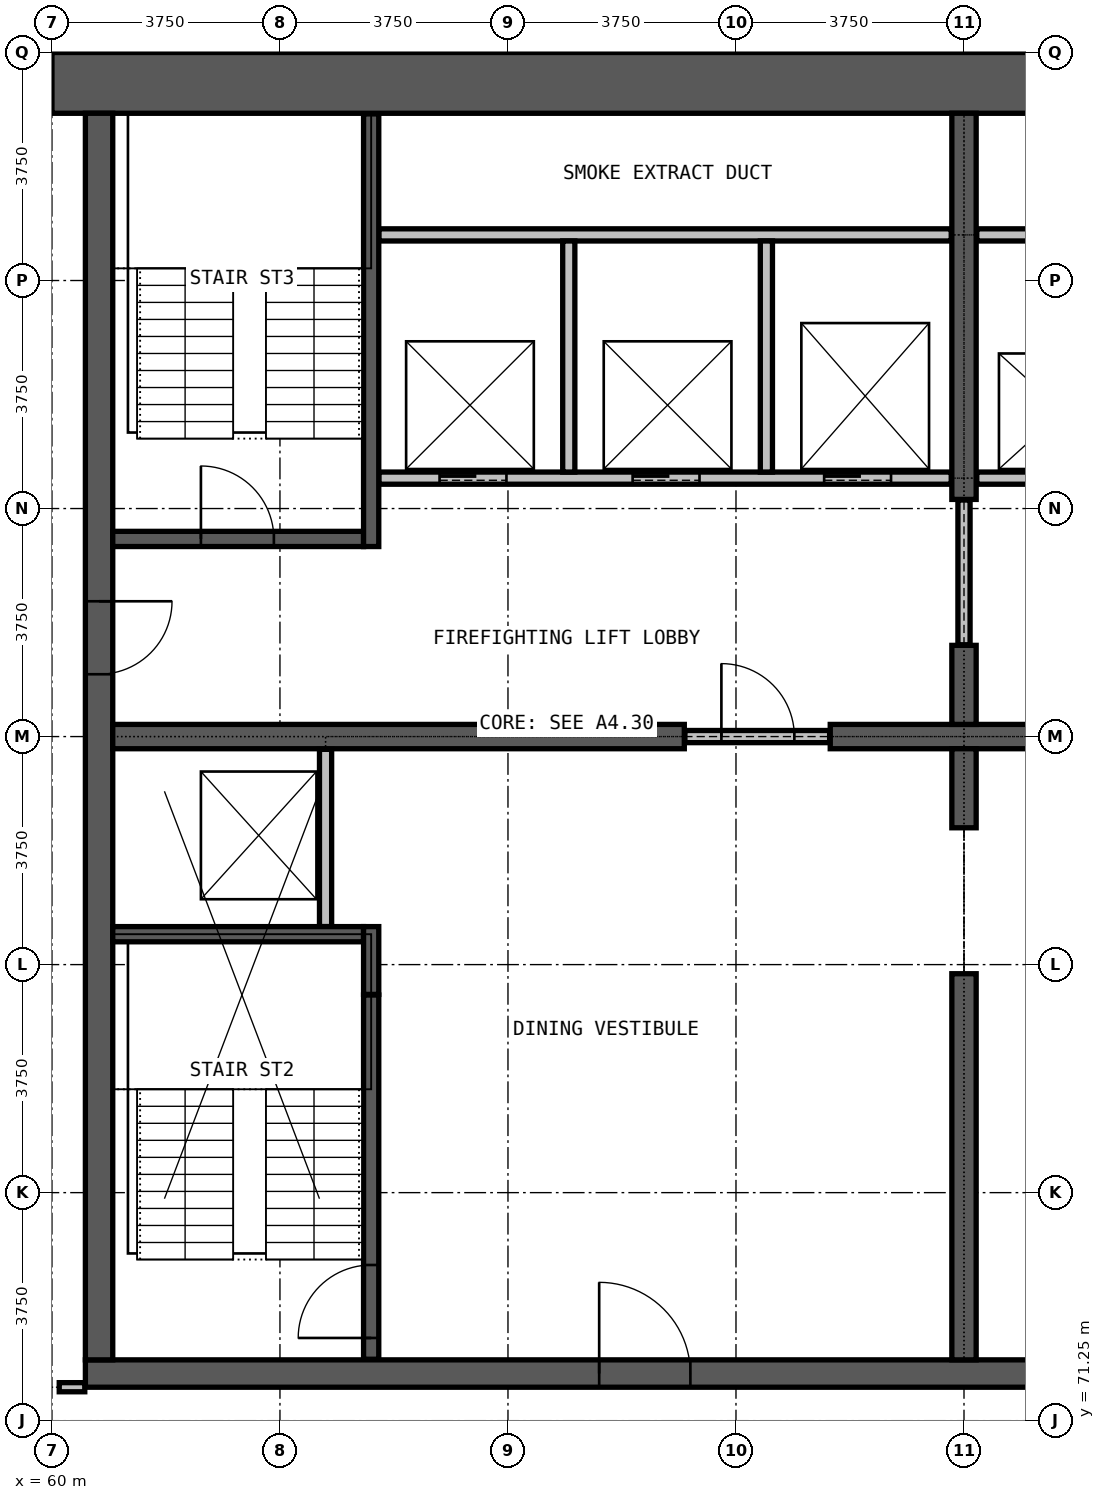
"""IFC4 building model, lengths in metres.
Left out: names, types, materials, properties, quantities, classifications, styles, units other than length and angle.
Written with IfcOpenShell. Run it as: python <this file> out.ifc"""

import sys

from ifc_helpers import new_model, si_unit, direction, frame, frame_2d, origin, place, context, subcontext, project, spatial, rectangle, extrude, element, fill, save


model = new_model("IFC4")
c1 = context("Model", 3, precision=1e-05, world=origin(), true_north=direction((0.0, 1.0)))
c2 = subcontext(c1, "Body", "Model", "MODEL_VIEW")
j1 = project(units=[si_unit("LENGTHUNIT", "METRE"), si_unit("PLANEANGLEUNIT", "RADIAN")], contexts=[c1])
p1 = place(None, origin())
s1 = spatial("IfcSite", under=j1, at=p1, CompositionType="ELEMENT")
p2 = place(p1, origin())
s2 = spatial("IfcBuilding", under=s1, at=p2, CompositionType="ELEMENT")
p3 = place(p2, frame((0.0, 0.0, 276.5)))
s3 = spatial("IfcBuildingStorey", under=s2, at=p3, CompositionType="ELEMENT", Elevation=276.5)
p4 = place(p3, frame((60.55, 72.025, 0.0), z_axis=(0.0, 0.0, 1.0), x_axis=(1.0, 0.0, 0.0)))
e1 = element("IfcWall", 1, at=p4, inside=s3, PredefinedType="SHEAR", context=c2, shape_type="SweptSolid", body=[
    extrude(rectangle(XDim=28.9, YDim=0.45, at=frame_2d((14.45, 0.0))), origin(), (0.0, 0.0, 1.0), 3.6),
])
p5 = place(p4, frame((8.45, 0.0, 0.0)))
e2 = element("IfcOpeningElement", 2, at=p5, cuts=e1, PredefinedType="OPENING", context=c2, shape_type="SweptSolid", body=[
    extrude(rectangle(XDim=1.5, YDim=2.2, at=frame_2d((0.75, 1.1))), frame((0.0, 0.235, 0.0), z_axis=(0.0, -1.0, 0.0), x_axis=(1.0, 0.0, 0.0)), (0.0, 0.0, 1.0), 0.47),
])
p6 = place(p3, frame((90.0, 93.25, 0.0), z_axis=(0.0, 0.0, 1.0), x_axis=(-1.0, 0.0, 0.0)))
e3 = element("IfcWall", 3, at=p6, inside=s3, PredefinedType="SHEAR", context=c2, shape_type="SweptSolid", body=[
    extrude(rectangle(XDim=30.0, YDim=1.0, at=frame_2d((15.0, 0.0))), origin(), (0.0, 0.0, 1.0), 3.6),
])
p7 = place(p3, frame((60.775, 92.75, 0.0), z_axis=(0.0, 0.0, 1.0), x_axis=(0.0, -1.0, 0.0)))
e4 = element("IfcWall", 4, at=p7, inside=s3, PredefinedType="SHEAR", context=c2, shape_type="SweptSolid", body=[
    extrude(rectangle(XDim=20.5, YDim=0.45, at=frame_2d((10.25, 0.0))), origin(), (0.0, 0.0, 1.0), 3.6),
])
p8 = place(p7, frame((8.025, 0.0, 0.0)))
e5 = element("IfcOpeningElement", 5, at=p8, cuts=e4, PredefinedType="OPENING", context=c2, shape_type="SweptSolid", body=[
    extrude(rectangle(XDim=1.2, YDim=2.2, at=frame_2d((0.6, 1.1))), frame((0.0, 0.235, 0.0), z_axis=(0.0, -1.0, 0.0), x_axis=(1.0, 0.0, 0.0)), (0.0, 0.0, 1.0), 0.47),
])
p9 = place(p3, frame((61.0, 82.5, 0.0), z_axis=(0.0, 0.0, 1.0), x_axis=(1.0, 0.0, 0.0)))
e6 = element("IfcWall", 6, at=p9, inside=s3, PredefinedType="SHEAR", context=c2, shape_type="SweptSolid", body=[
    extrude(rectangle(XDim=9.4, YDim=0.4, at=frame_2d((4.7, 0.0))), origin(), (0.0, 0.0, 1.0), 3.6),
])
p10 = place(p3, frame((72.8, 82.5, 0.0), z_axis=(0.0, 0.0, 1.0), x_axis=(1.0, 0.0, 0.0)))
e7 = element("IfcWall", 7, at=p10, inside=s3, PredefinedType="SHEAR", context=c2, shape_type="SweptSolid", body=[
    extrude(rectangle(XDim=4.4, YDim=0.4, at=frame_2d((2.2, 0.0))), origin(), (0.0, 0.0, 1.0), 3.6),
])
p11 = place(p3, frame((75.0, 72.25, 0.0), z_axis=(0.0, 0.0, 1.0), x_axis=(0.0, 1.0, 0.0)))
e8 = element("IfcWall", 8, at=p11, inside=s3, PredefinedType="SHEAR", context=c2, shape_type="SweptSolid", body=[
    extrude(rectangle(XDim=6.35, YDim=0.4, at=frame_2d((3.175, 0.0))), origin(), (0.0, 0.0, 1.0), 3.6),
])
for number, where, z_axis, x_axis in (
    (9, (75.0, 81.0, 0.0), (0.0, 0.0, 1.0), (0.0, 1.0, 0.0)),
    (10, (75.0, 82.7, 0.0), (0.0, 0.0, 1.0), (0.0, 1.0, 0.0)),
):
    element("IfcWall", number, at=place(p3, frame(where, z_axis=z_axis, x_axis=x_axis)), inside=s3, PredefinedType="SHEAR", context=c2, shape_type="SweptSolid", body=[
        extrude(rectangle(XDim=1.3, YDim=0.4, at=frame_2d((0.65, 0.0))), origin(), (0.0, 0.0, 1.0), 3.6),
    ])
p12 = place(p3, frame((75.0, 86.4, 0.0), z_axis=(0.0, 0.0, 1.0), x_axis=(0.0, 1.0, 0.0)))
e11 = element("IfcWall", 11, at=p12, inside=s3, PredefinedType="SHEAR", context=c2, shape_type="SweptSolid", body=[
    extrude(rectangle(XDim=6.35, YDim=0.4, at=frame_2d((3.175, 0.0))), origin(), (0.0, 0.0, 1.0), 3.6),
])
p13 = place(p3, frame((70.41, 82.5, 0.0), z_axis=(0.0, 0.0, 1.0), x_axis=(1.0, 0.0, 0.0)))
e12 = element("IfcWall", 12, at=p13, inside=s3, PredefinedType="PARTITIONING", context=c2, shape_type="SweptSolid", body=[
    extrude(rectangle(XDim=2.38, YDim=0.2, at=frame_2d((1.19, 0.0))), origin(), (0.0, 0.0, 1.0), 2.4),
])
p14 = place(p13, frame((0.6, 0.0, 0.0)))
e13 = element("IfcOpeningElement", 13, at=p14, cuts=e12, PredefinedType="OPENING", context=c2, shape_type="SweptSolid", body=[
    extrude(rectangle(XDim=1.2, YDim=2.2, at=frame_2d((0.6, 1.1))), frame((0.0, 0.11, 0.0), z_axis=(0.0, -1.0, 0.0), x_axis=(1.0, 0.0, 0.0)), (0.0, 0.0, 1.0), 0.22),
])
p15 = place(p3, frame((75.0, 84.01, 0.0), z_axis=(0.0, 0.0, 1.0), x_axis=(0.0, 1.0, 0.0)))
e14 = element("IfcWall", 14, at=p15, inside=s3, PredefinedType="PARTITIONING", context=c2, shape_type="SweptSolid", body=[
    extrude(rectangle(XDim=2.38, YDim=0.2, at=frame_2d((1.19, 0.0))), origin(), (0.0, 0.0, 1.0), 2.4),
])
p16 = place(p3, frame((60.12, 71.8, 0.0), z_axis=(0.0, 0.0, 1.0), x_axis=(1.0, 0.0, 0.0)))
e15 = element("IfcWall", 15, at=p16, inside=s3, PredefinedType="PARTITIONING", context=c2, shape_type="SweptSolid", body=[
    extrude(rectangle(XDim=0.42, YDim=0.15, at=frame_2d((0.21, 0.0))), origin(), (0.0, 0.0, 1.0), 3.3),
])
p17 = place(p3, frame((65.375, 86.75, 0.0), z_axis=(0.0, 0.0, 1.0), x_axis=(1.0, 0.0, 0.0)))
e16 = element("IfcWall", 16, at=p17, inside=s3, PredefinedType="PARTITIONING", context=c2, shape_type="SweptSolid", body=[
    extrude(rectangle(XDim=9.415, YDim=0.2, at=frame_2d((4.708, 0.0))), origin(), (0.0, 0.0, 1.0), 3.3),
])
p18 = place(p17, frame((1.0, 0.0, 0.0)))
e17 = element("IfcOpeningElement", 17, at=p18, cuts=e16, PredefinedType="OPENING", context=c2, shape_type="SweptSolid", body=[
    extrude(rectangle(XDim=1.1, YDim=2.2, at=frame_2d((0.55, 1.1))), frame((0.0, 0.11, 0.0), z_axis=(0.0, -1.0, 0.0), x_axis=(1.0, 0.0, 0.0)), (0.0, 0.0, 1.0), 0.22),
])
p19 = place(p17, frame((4.175, 0.0, 0.0)))
e18 = element("IfcOpeningElement", 18, at=p19, cuts=e16, PredefinedType="OPENING", context=c2, shape_type="SweptSolid", body=[
    extrude(rectangle(XDim=1.1, YDim=2.2, at=frame_2d((0.55, 1.1))), frame((0.0, 0.11, 0.0), z_axis=(0.0, -1.0, 0.0), x_axis=(1.0, 0.0, 0.0)), (0.0, 0.0, 1.0), 0.22),
])
p20 = place(p17, frame((7.325, 0.0, 0.0)))
e19 = element("IfcOpeningElement", 19, at=p20, cuts=e16, PredefinedType="OPENING", context=c2, shape_type="SweptSolid", body=[
    extrude(rectangle(XDim=1.1, YDim=2.2, at=frame_2d((0.55, 1.1))), frame((0.0, 0.11, 0.0), z_axis=(0.0, -1.0, 0.0), x_axis=(1.0, 0.0, 0.0)), (0.0, 0.0, 1.0), 0.22),
])
p21 = place(p3, frame((75.21, 86.75, 0.0), z_axis=(0.0, 0.0, 1.0), x_axis=(1.0, 0.0, 0.0)))
e20 = element("IfcWall", 20, at=p21, inside=s3, PredefinedType="PARTITIONING", context=c2, shape_type="SweptSolid", body=[
    extrude(rectangle(XDim=9.415, YDim=0.2, at=frame_2d((4.708, 0.0))), origin(), (0.0, 0.0, 1.0), 3.3),
])
p22 = place(p21, frame((0.95, 0.0, 0.0)))
e21 = element("IfcOpeningElement", 21, at=p22, cuts=e20, PredefinedType="OPENING", context=c2, shape_type="SweptSolid", body=[
    extrude(rectangle(XDim=1.1, YDim=2.2, at=frame_2d((0.55, 1.1))), frame((0.0, 0.11, 0.0), z_axis=(0.0, -1.0, 0.0), x_axis=(1.0, 0.0, 0.0)), (0.0, 0.0, 1.0), 0.22),
])
p23 = place(p21, frame((4.14, 0.0, 0.0)))
e22 = element("IfcOpeningElement", 22, at=p23, cuts=e20, PredefinedType="OPENING", context=c2, shape_type="SweptSolid", body=[
    extrude(rectangle(XDim=1.1, YDim=2.2, at=frame_2d((0.55, 1.1))), frame((0.0, 0.11, 0.0), z_axis=(0.0, -1.0, 0.0), x_axis=(1.0, 0.0, 0.0)), (0.0, 0.0, 1.0), 0.22),
])
p24 = place(p21, frame((7.29, 0.0, 0.0)))
e23 = element("IfcOpeningElement", 23, at=p24, cuts=e20, PredefinedType="OPENING", context=c2, shape_type="SweptSolid", body=[
    extrude(rectangle(XDim=1.1, YDim=2.2, at=frame_2d((0.55, 1.1))), frame((0.0, 0.11, 0.0), z_axis=(0.0, -1.0, 0.0), x_axis=(1.0, 0.0, 0.0)), (0.0, 0.0, 1.0), 0.22),
])
for number, where, z_axis, x_axis in (
    (24, (65.375, 90.75, 0.0), (0.0, 0.0, 1.0), (1.0, 0.0, 0.0)),
    (25, (75.21, 90.75, 0.0), (0.0, 0.0, 1.0), (1.0, 0.0, 0.0)),
):
    element("IfcWall", number, at=place(p3, frame(where, z_axis=z_axis, x_axis=x_axis)), inside=s3, PredefinedType="PARTITIONING", context=c2, shape_type="SweptSolid", body=[
        extrude(rectangle(XDim=9.415, YDim=0.2, at=frame_2d((4.708, 0.0))), origin(), (0.0, 0.0, 1.0), 3.3),
    ])
p25 = place(p3, frame((64.5, 79.375, 0.0), z_axis=(0.0, 0.0, 1.0), x_axis=(0.0, 1.0, 0.0)))
e26 = element("IfcWall", 26, at=p25, inside=s3, PredefinedType="PARTITIONING", context=c2, shape_type="SweptSolid", body=[
    extrude(rectangle(XDim=2.915, YDim=0.2, at=frame_2d((1.458, 0.0))), origin(), (0.0, 0.0, 1.0), 3.3),
])
for number, where, z_axis, x_axis in (
    (27, (68.5, 86.85, 0.0), (0.0, 0.0, 1.0), (0.0, 1.0, 0.0)),
    (28, (71.75, 86.85, 0.0), (0.0, 0.0, 1.0), (0.0, 1.0, 0.0)),
):
    element("IfcWall", number, at=place(p3, frame(where, z_axis=z_axis, x_axis=x_axis)), inside=s3, PredefinedType="PARTITIONING", context=c2, shape_type="SweptSolid", body=[
        extrude(rectangle(XDim=3.8, YDim=0.2, at=frame_2d((1.9, 0.0))), origin(), (0.0, 0.0, 1.0), 3.3),
    ])
p26 = place(p3, frame((61.0, 79.25, 0.0), z_axis=(0.0, 0.0, 1.0), x_axis=(1.0, 0.0, 0.0)))
e29 = element("IfcWall", 29, at=p26, inside=s3, PredefinedType="PARTITIONING", context=c2, shape_type="SweptSolid", body=[
    extrude(rectangle(XDim=4.125, YDim=0.25, at=frame_2d((2.062, 0.0))), origin(), (0.0, 0.0, 1.0), 3.3),
])
p27 = place(p3, frame((61.0, 85.75, 0.0), z_axis=(0.0, 0.0, 1.0), x_axis=(1.0, 0.0, 0.0)))
e30 = element("IfcWall", 30, at=p27, inside=s3, PredefinedType="PARTITIONING", context=c2, shape_type="SweptSolid", body=[
    extrude(rectangle(XDim=4.125, YDim=0.25, at=frame_2d((2.062, 0.0))), origin(), (0.0, 0.0, 1.0), 3.3),
])
p28 = place(p27, frame((1.45, 0.0, 0.0)))
e31 = element("IfcOpeningElement", 31, at=p28, cuts=e30, PredefinedType="OPENING", context=c2, shape_type="SweptSolid", body=[
    extrude(rectangle(XDim=1.2, YDim=2.2, at=frame_2d((0.6, 1.1))), frame((0.0, 0.135, 0.0), z_axis=(0.0, -1.0, 0.0), x_axis=(1.0, 0.0, 0.0)), (0.0, 0.0, 1.0), 0.27),
])
p29 = place(p3, frame((65.25, 72.26, 0.0), z_axis=(0.0, 0.0, 1.0), x_axis=(0.0, 1.0, 0.0)))
e32 = element("IfcWall", 32, at=p29, inside=s3, PredefinedType="PARTITIONING", context=c2, shape_type="SweptSolid", body=[
    extrude(rectangle(XDim=5.99, YDim=0.25, at=frame_2d((2.995, 0.0))), origin(), (0.0, 0.0, 1.0), 3.3),
])
p30 = place(p29, frame((0.35, 0.0, 0.0)))
e33 = element("IfcOpeningElement", 33, at=p30, cuts=e32, PredefinedType="OPENING", context=c2, shape_type="SweptSolid", body=[
    extrude(rectangle(XDim=1.2, YDim=2.2, at=frame_2d((0.6, 1.1))), frame((0.0, 0.135, 0.0), z_axis=(0.0, -1.0, 0.0), x_axis=(1.0, 0.0, 0.0)), (0.0, 0.0, 1.0), 0.27),
])
p31 = place(p3, frame((65.25, 78.26, 0.0), z_axis=(0.0, 0.0, 1.0), x_axis=(0.0, 1.0, 0.0)))
e34 = element("IfcWall", 34, at=p31, inside=s3, PredefinedType="PARTITIONING", context=c2, shape_type="SweptSolid", body=[
    extrude(rectangle(XDim=1.115, YDim=0.25, at=frame_2d((0.558, 0.0))), origin(), (0.0, 0.0, 1.0), 3.3),
])
p32 = place(p3, frame((65.25, 85.625, 0.0), z_axis=(0.0, 0.0, 1.0), x_axis=(0.0, 1.0, 0.0)))
e35 = element("IfcWall", 35, at=p32, inside=s3, PredefinedType="PARTITIONING", context=c2, shape_type="SweptSolid", body=[
    extrude(rectangle(XDim=7.115, YDim=0.25, at=frame_2d((3.558, 0.0))), origin(), (0.0, 0.0, 1.0), 3.3),
])
p33 = place(p18, origin())
e36 = element("IfcDoor", 36, at=p33, inside=s3, OperationType="DOUBLE_DOOR_SLIDING", PredefinedType="DOOR", context=c2, shape_type="SweptSolid", body=[
    extrude(rectangle(XDim=1.1, YDim=2.2, at=frame_2d((0.55, 1.1))), frame((0.0, 0.025, 0.0), z_axis=(0.0, -1.0, 0.0), x_axis=(1.0, 0.0, 0.0)), (0.0, 0.0, 1.0), 0.05),
])
fill(e17, e36)
p34 = place(p19, origin())
e37 = element("IfcDoor", 37, at=p34, inside=s3, OperationType="DOUBLE_DOOR_SLIDING", PredefinedType="DOOR", context=c2, shape_type="SweptSolid", body=[
    extrude(rectangle(XDim=1.1, YDim=2.2, at=frame_2d((0.55, 1.1))), frame((0.0, 0.025, 0.0), z_axis=(0.0, -1.0, 0.0), x_axis=(1.0, 0.0, 0.0)), (0.0, 0.0, 1.0), 0.05),
])
fill(e18, e37)
p35 = place(p20, origin())
e38 = element("IfcDoor", 38, at=p35, inside=s3, OperationType="DOUBLE_DOOR_SLIDING", PredefinedType="DOOR", context=c2, shape_type="SweptSolid", body=[
    extrude(rectangle(XDim=1.1, YDim=2.2, at=frame_2d((0.55, 1.1))), frame((0.0, 0.025, 0.0), z_axis=(0.0, -1.0, 0.0), x_axis=(1.0, 0.0, 0.0)), (0.0, 0.0, 1.0), 0.05),
])
fill(e19, e38)
p36 = place(p14, origin())
e39 = element("IfcDoor", 39, at=p36, inside=s3, OperationType="SINGLE_SWING_LEFT", PredefinedType="DOOR", context=c2, shape_type="SweptSolid", body=[
    extrude(rectangle(XDim=1.2, YDim=2.2, at=frame_2d((0.6, 1.1))), frame((0.0, 0.025, 0.0), z_axis=(0.0, -1.0, 0.0), x_axis=(1.0, 0.0, 0.0)), (0.0, 0.0, 1.0), 0.05),
])
fill(e13, e39)
p37 = place(p28, origin())
e40 = element("IfcDoor", 40, at=p37, inside=s3, OperationType="SINGLE_SWING_RIGHT", PredefinedType="DOOR", context=c2, shape_type="SweptSolid", body=[
    extrude(rectangle(XDim=1.2, YDim=2.2, at=frame_2d((0.6, 1.1))), frame((0.0, 0.025, 0.0), z_axis=(0.0, -1.0, 0.0), x_axis=(1.0, 0.0, 0.0)), (0.0, 0.0, 1.0), 0.05),
])
fill(e31, e40)
p38 = place(p30, origin())
e41 = element("IfcDoor", 41, at=p38, inside=s3, OperationType="SINGLE_SWING_RIGHT", PredefinedType="DOOR", context=c2, shape_type="SweptSolid", body=[
    extrude(rectangle(XDim=1.2, YDim=2.2, at=frame_2d((0.6, 1.1))), frame((0.0, 0.025, 0.0), z_axis=(0.0, -1.0, 0.0), x_axis=(1.0, 0.0, 0.0)), (0.0, 0.0, 1.0), 0.05),
])
fill(e33, e41)
p39 = place(p5, origin())
e42 = element("IfcDoor", 42, at=p39, inside=s3, OperationType="DOUBLE_DOOR_SINGLE_SWING", PredefinedType="DOOR", context=c2, shape_type="SweptSolid", body=[
    extrude(rectangle(XDim=1.5, YDim=2.2, at=frame_2d((0.75, 1.1))), frame((0.0, 0.025, 0.0), z_axis=(0.0, -1.0, 0.0), x_axis=(1.0, 0.0, 0.0)), (0.0, 0.0, 1.0), 0.05),
])
fill(e2, e42)
p40 = place(p8, origin())
e43 = element("IfcDoor", 43, at=p40, inside=s3, OperationType="SINGLE_SWING_RIGHT", PredefinedType="DOOR", context=c2, shape_type="SweptSolid", body=[
    extrude(rectangle(XDim=1.2, YDim=2.2, at=frame_2d((0.6, 1.1))), frame((0.0, 0.025, 0.0), z_axis=(0.0, -1.0, 0.0), x_axis=(1.0, 0.0, 0.0)), (0.0, 0.0, 1.0), 0.05),
])
fill(e5, e43)
save(model, sys.argv[1])
